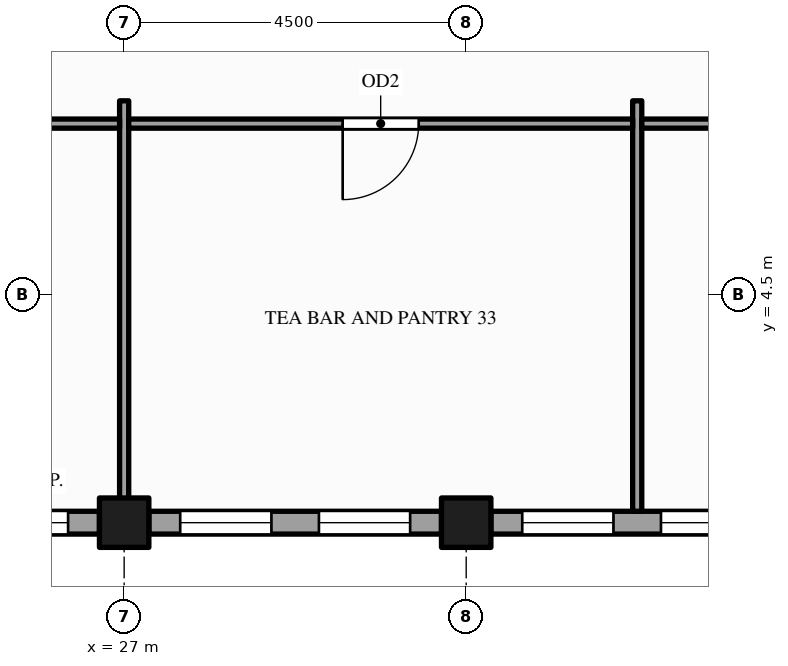
"""IFC4 building model, lengths in metres.
Left out: names, types, materials, properties, quantities, classifications, styles, units other than length and angle.
Written with IfcOpenShell. Run it as: python <this file> out.ifc"""

import sys

from ifc_helpers import new_model, si_unit, direction, frame, frame_2d, origin, origin_2d, place, context, subcontext, project, spatial, rectangle, hollow_rectangle, extrude, element, fill, save


model = new_model("IFC4")
c1 = context("Model", 3, precision=1e-05, world=origin(), true_north=direction((0.0, 1.0)))
c2 = subcontext(c1, "Body", "Model", "MODEL_VIEW")
j1 = project(units=[si_unit("LENGTHUNIT", "METRE"), si_unit("PLANEANGLEUNIT", "RADIAN")], contexts=[c1])
p1 = place(None, origin())
s1 = spatial("IfcSite", under=j1, at=p1, CompositionType="ELEMENT")
p2 = place(p1, origin())
s2 = spatial("IfcBuilding", under=s1, at=p2, CompositionType="ELEMENT")
p3 = place(p2, frame((0.0, 0.0, 269.0)))
s3 = spatial("IfcBuildingStorey", under=s2, at=p3, CompositionType="ELEMENT", Elevation=269.0)
for number, where, z_axis, x_axis in (
    (1, (27.0, 1.5, -0.15), (0.0, 0.0, 1.0), (1.0, 0.0, 0.0)),
    (2, (31.5, 1.5, -0.15), (0.0, 0.0, 1.0), (1.0, 0.0, 0.0)),
):
    element("IfcColumn", number, at=place(p3, frame(where, z_axis=z_axis, x_axis=x_axis)), inside=s3, PredefinedType="COLUMN", context=c2, shape_type="SweptSolid", body=[
        extrude(hollow_rectangle(XDim=0.65, YDim=0.65, WallThickness=0.032, at=origin_2d()), origin(), (0.0, 0.0, 1.0), 4.0),
    ])
p4 = place(p3, frame((22.825, 1.5, 0.0), z_axis=(0.0, 0.0, 1.0), x_axis=(1.0, 0.0, 0.0)))
e3 = element("IfcWall", 3, at=p4, inside=s3, PredefinedType="STANDARD", context=c2, shape_type="SweptSolid", body=[
    extrude(rectangle(XDim=3.85, YDim=0.3, at=frame_2d((1.925, 0.0))), origin(), (0.0, 0.0, 1.0), 2.87),
])
p5 = place(p4, frame((0.413, 0.0, 0.9)))
e4 = element("IfcOpeningElement", 4, at=p5, cuts=e3, PredefinedType="OPENING", context=c2, shape_type="SweptSolid", body=[
    extrude(rectangle(XDim=1.2, YDim=1.75, at=frame_2d((0.6, 0.875))), frame((0.0, 0.16, 0.0), z_axis=(0.0, -1.0, 0.0), x_axis=(1.0, 0.0, 0.0)), (0.0, 0.0, 1.0), 0.32),
])
p6 = place(p4, frame((2.238, 0.0, 0.9)))
e5 = element("IfcOpeningElement", 5, at=p6, cuts=e3, PredefinedType="OPENING", context=c2, shape_type="SweptSolid", body=[
    extrude(rectangle(XDim=1.2, YDim=1.75, at=frame_2d((0.6, 0.875))), frame((0.0, 0.16, 0.0), z_axis=(0.0, -1.0, 0.0), x_axis=(1.0, 0.0, 0.0)), (0.0, 0.0, 1.0), 0.32),
])
p7 = place(p3, frame((27.325, 1.5, 0.0), z_axis=(0.0, 0.0, 1.0), x_axis=(1.0, 0.0, 0.0)))
e6 = element("IfcWall", 6, at=p7, inside=s3, PredefinedType="STANDARD", context=c2, shape_type="SweptSolid", body=[
    extrude(rectangle(XDim=3.85, YDim=0.3, at=frame_2d((1.925, 0.0))), origin(), (0.0, 0.0, 1.0), 2.87),
])
p8 = place(p7, frame((0.413, 0.0, 0.9)))
e7 = element("IfcOpeningElement", 7, at=p8, cuts=e6, PredefinedType="OPENING", context=c2, shape_type="SweptSolid", body=[
    extrude(rectangle(XDim=1.2, YDim=1.75, at=frame_2d((0.6, 0.875))), frame((0.0, 0.16, 0.0), z_axis=(0.0, -1.0, 0.0), x_axis=(1.0, 0.0, 0.0)), (0.0, 0.0, 1.0), 0.32),
])
p9 = place(p7, frame((2.238, 0.0, 0.9)))
e8 = element("IfcOpeningElement", 8, at=p9, cuts=e6, PredefinedType="OPENING", context=c2, shape_type="SweptSolid", body=[
    extrude(rectangle(XDim=1.2, YDim=1.75, at=frame_2d((0.6, 0.875))), frame((0.0, 0.16, 0.0), z_axis=(0.0, -1.0, 0.0), x_axis=(1.0, 0.0, 0.0)), (0.0, 0.0, 1.0), 0.32),
])
p10 = place(p3, frame((31.825, 1.5, 0.0), z_axis=(0.0, 0.0, 1.0), x_axis=(1.0, 0.0, 0.0)))
e9 = element("IfcWall", 9, at=p10, inside=s3, PredefinedType="STANDARD", context=c2, shape_type="SweptSolid", body=[
    extrude(rectangle(XDim=3.85, YDim=0.3, at=frame_2d((1.925, 0.0))), origin(), (0.0, 0.0, 1.0), 2.87),
])
p11 = place(p10, frame((0.413, 0.0, 0.9)))
e10 = element("IfcOpeningElement", 10, at=p11, cuts=e9, PredefinedType="OPENING", context=c2, shape_type="SweptSolid", body=[
    extrude(rectangle(XDim=1.2, YDim=1.75, at=frame_2d((0.6, 0.875))), frame((0.0, 0.16, 0.0), z_axis=(0.0, -1.0, 0.0), x_axis=(1.0, 0.0, 0.0)), (0.0, 0.0, 1.0), 0.32),
])
p12 = place(p10, frame((2.238, 0.0, 0.9)))
e11 = element("IfcOpeningElement", 11, at=p12, cuts=e9, PredefinedType="OPENING", context=c2, shape_type="SweptSolid", body=[
    extrude(rectangle(XDim=1.2, YDim=1.75, at=frame_2d((0.6, 0.875))), frame((0.0, 0.16, 0.0), z_axis=(0.0, -1.0, 0.0), x_axis=(1.0, 0.0, 0.0)), (0.0, 0.0, 1.0), 0.32),
])
for number, where, z_axis, x_axis in (
    (12, (27.0, 1.65, 0.0), (0.0, 0.0, 1.0), (0.0, 1.0, 0.0)),
    (13, (33.75, 1.65, 0.0), (0.0, 0.0, 1.0), (0.0, 1.0, 0.0)),
):
    element("IfcWall", number, at=place(p3, frame(where, z_axis=z_axis, x_axis=x_axis)), inside=s3, PredefinedType="PARTITIONING", context=c2, shape_type="SweptSolid", body=[
        extrude(rectangle(XDim=5.4, YDim=0.12, at=frame_2d((2.7, 0.0))), origin(), (0.0, 0.0, 1.0), 2.87),
    ])
p13 = place(p3, frame((22.56, 6.75, 0.0), z_axis=(0.0, 0.0, 1.0), x_axis=(1.0, 0.0, 0.0)))
e14 = element("IfcWall", 14, at=p13, inside=s3, PredefinedType="PARTITIONING", context=c2, shape_type="SweptSolid", body=[
    extrude(rectangle(XDim=4.38, YDim=0.12, at=frame_2d((2.19, 0.0))), origin(), (0.0, 0.0, 1.0), 2.87),
])
p14 = place(p13, frame((1.69, 0.0, 0.0)))
e15 = element("IfcOpeningElement", 15, at=p14, cuts=e14, PredefinedType="OPENING", context=c2, shape_type="SweptSolid", body=[
    extrude(rectangle(XDim=1.0, YDim=2.1, at=frame_2d((0.5, 1.05))), frame((0.0, 0.07, 0.0), z_axis=(0.0, -1.0, 0.0), x_axis=(1.0, 0.0, 0.0)), (0.0, 0.0, 1.0), 0.14),
])
p15 = place(p3, frame((27.06, 6.75, 0.0), z_axis=(0.0, 0.0, 1.0), x_axis=(1.0, 0.0, 0.0)))
e16 = element("IfcWall", 16, at=p15, inside=s3, PredefinedType="PARTITIONING", context=c2, shape_type="SweptSolid", body=[
    extrude(rectangle(XDim=6.63, YDim=0.12, at=frame_2d((3.315, 0.0))), origin(), (0.0, 0.0, 1.0), 2.87),
])
p16 = place(p15, frame((2.815, 0.0, 0.0)))
e17 = element("IfcOpeningElement", 17, at=p16, cuts=e16, PredefinedType="OPENING", context=c2, shape_type="SweptSolid", body=[
    extrude(rectangle(XDim=1.0, YDim=2.1, at=frame_2d((0.5, 1.05))), frame((0.0, 0.07, 0.0), z_axis=(0.0, -1.0, 0.0), x_axis=(1.0, 0.0, 0.0)), (0.0, 0.0, 1.0), 0.14),
])
p17 = place(p3, frame((33.81, 6.75, 0.0), z_axis=(0.0, 0.0, 1.0), x_axis=(1.0, 0.0, 0.0)))
e18 = element("IfcWall", 18, at=p17, inside=s3, PredefinedType="PARTITIONING", context=c2, shape_type="SweptSolid", body=[
    extrude(rectangle(XDim=6.63, YDim=0.12, at=frame_2d((3.315, 0.0))), origin(), (0.0, 0.0, 1.0), 2.87),
])
p18 = place(p17, frame((2.865, 0.0, 0.0)))
e19 = element("IfcOpeningElement", 19, at=p18, cuts=e18, PredefinedType="OPENING", context=c2, shape_type="SweptSolid", body=[
    extrude(rectangle(XDim=0.9, YDim=2.1, at=frame_2d((0.45, 1.05))), frame((0.0, 0.07, 0.0), z_axis=(0.0, -1.0, 0.0), x_axis=(1.0, 0.0, 0.0)), (0.0, 0.0, 1.0), 0.14),
])
p19 = place(p6, origin())
e20 = element("IfcWindow", 20, at=p19, inside=s3, PartitioningType="SINGLE_PANEL", PredefinedType="WINDOW", context=c2, shape_type="SweptSolid", body=[
    extrude(rectangle(XDim=1.2, YDim=1.75, at=frame_2d((0.6, 0.875))), frame((0.0, 0.03, 0.0), z_axis=(0.0, -1.0, 0.0), x_axis=(1.0, 0.0, 0.0)), (0.0, 0.0, 1.0), 0.06),
])
fill(e5, e20)
p20 = place(p8, origin())
e21 = element("IfcWindow", 21, at=p20, inside=s3, PartitioningType="SINGLE_PANEL", PredefinedType="WINDOW", context=c2, shape_type="SweptSolid", body=[
    extrude(rectangle(XDim=1.2, YDim=1.75, at=frame_2d((0.6, 0.875))), frame((0.0, 0.03, 0.0), z_axis=(0.0, -1.0, 0.0), x_axis=(1.0, 0.0, 0.0)), (0.0, 0.0, 1.0), 0.06),
])
fill(e7, e21)
p21 = place(p9, origin())
e22 = element("IfcWindow", 22, at=p21, inside=s3, PartitioningType="SINGLE_PANEL", PredefinedType="WINDOW", context=c2, shape_type="SweptSolid", body=[
    extrude(rectangle(XDim=1.2, YDim=1.75, at=frame_2d((0.6, 0.875))), frame((0.0, 0.03, 0.0), z_axis=(0.0, -1.0, 0.0), x_axis=(1.0, 0.0, 0.0)), (0.0, 0.0, 1.0), 0.06),
])
fill(e8, e22)
p22 = place(p11, origin())
e23 = element("IfcWindow", 23, at=p22, inside=s3, PartitioningType="SINGLE_PANEL", PredefinedType="WINDOW", context=c2, shape_type="SweptSolid", body=[
    extrude(rectangle(XDim=1.2, YDim=1.75, at=frame_2d((0.6, 0.875))), frame((0.0, 0.03, 0.0), z_axis=(0.0, -1.0, 0.0), x_axis=(1.0, 0.0, 0.0)), (0.0, 0.0, 1.0), 0.06),
])
fill(e10, e23)
p23 = place(p12, origin())
e24 = element("IfcWindow", 24, at=p23, inside=s3, PartitioningType="SINGLE_PANEL", PredefinedType="WINDOW", context=c2, shape_type="SweptSolid", body=[
    extrude(rectangle(XDim=1.2, YDim=1.75, at=frame_2d((0.6, 0.875))), frame((0.0, 0.03, 0.0), z_axis=(0.0, -1.0, 0.0), x_axis=(1.0, 0.0, 0.0)), (0.0, 0.0, 1.0), 0.06),
])
fill(e11, e24)
p24 = place(p16, origin())
e25 = element("IfcDoor", 25, at=p24, inside=s3, OperationType="SINGLE_SWING_LEFT", PredefinedType="DOOR", context=c2, shape_type="SweptSolid", body=[
    extrude(rectangle(XDim=1.0, YDim=2.1, at=frame_2d((0.5, 1.05))), frame((0.0, 0.025, 0.0), z_axis=(0.0, -1.0, 0.0), x_axis=(1.0, 0.0, 0.0)), (0.0, 0.0, 1.0), 0.05),
])
fill(e17, e25)
save(model, sys.argv[1])
